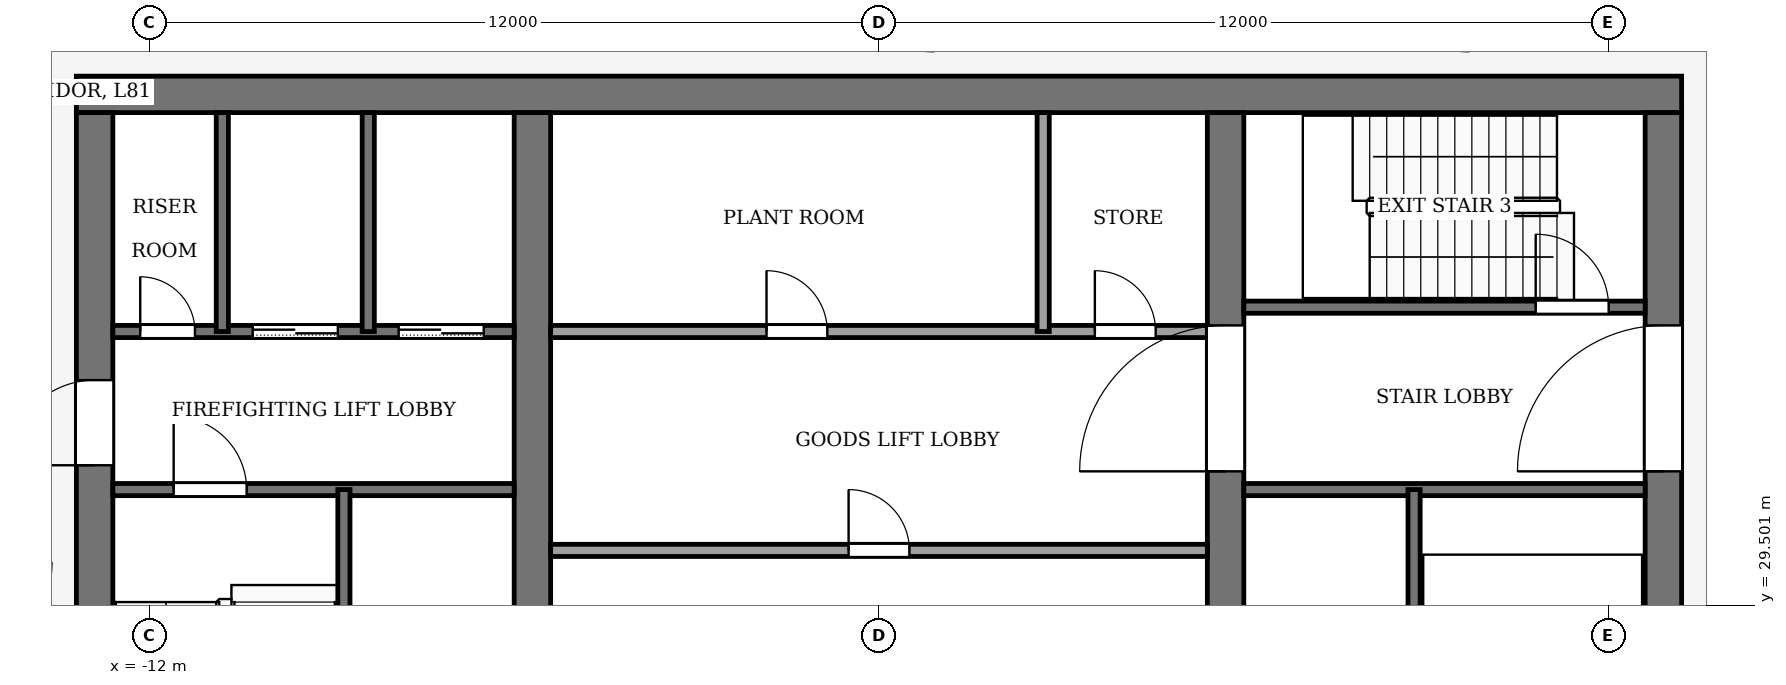
"""IFC4 building model, lengths in metres.
Left out: names, types, materials, properties, quantities, classifications, styles, units other than length and angle.
Written with IfcOpenShell. Run it as: python <this file> out.ifc"""

import sys

from ifc_helpers import new_model, si_unit, direction, frame, frame_2d, origin, place, context, subcontext, project, spatial, rectangle, extrude, element, fill, save


model = new_model("IFC4")
c1 = context("Model", 3, precision=1e-05, world=origin(), true_north=direction((0.0, 1.0)))
c2 = subcontext(c1, "Body", "Model", "MODEL_VIEW")
j1 = project(units=[si_unit("LENGTHUNIT", "METRE"), si_unit("PLANEANGLEUNIT", "RADIAN")], contexts=[c1])
p1 = place(None, origin())
s1 = spatial("IfcSite", under=j1, at=p1, CompositionType="ELEMENT")
p2 = place(p1, origin())
s2 = spatial("IfcBuilding", under=s1, at=p2, CompositionType="ELEMENT")
p3 = place(p2, frame((0.0, 0.0, 359.5)))
s3 = spatial("IfcBuildingStorey", under=s2, at=p3, CompositionType="ELEMENT", Elevation=359.5)
p4 = place(p3, frame((-13.2, 37.9, -0.15), z_axis=(0.0, 0.0, 1.0), x_axis=(1.0, 0.0, 0.0)))
e1 = element("IfcWall", 1, at=p4, inside=s3, PredefinedType="SHEAR", context=c2, shape_type="SweptSolid", body=[
    extrude(rectangle(XDim=26.4, YDim=0.6, at=frame_2d((13.2, 0.0))), origin(), (0.0, 0.0, 1.0), 4.5),
])
p5 = place(p3, frame((-12.9, 18.4, -0.15), z_axis=(0.0, 0.0, 1.0), x_axis=(0.0, 1.0, 0.0)))
e2 = element("IfcWall", 2, at=p5, inside=s3, PredefinedType="SHEAR", context=c2, shape_type="SweptSolid", body=[
    extrude(rectangle(XDim=19.2, YDim=0.6, at=frame_2d((9.6, 0.0))), origin(), (0.0, 0.0, 1.0), 4.5),
])
p6 = place(p5, frame((2.8, 0.0, 0.15)))
e3 = element("IfcOpeningElement", 3, at=p6, cuts=e2, PredefinedType="OPENING", context=c2, shape_type="SweptSolid", body=[
    extrude(rectangle(XDim=2.4, YDim=2.4, at=frame_2d((1.2, 1.2))), frame((0.0, 0.31, 0.0), z_axis=(0.0, -1.0, 0.0), x_axis=(1.0, 0.0, 0.0)), (0.0, 0.0, 1.0), 0.62),
])
p7 = place(p5, frame((13.4, 0.0, 0.15)))
e4 = element("IfcOpeningElement", 4, at=p7, cuts=e2, PredefinedType="OPENING", context=c2, shape_type="SweptSolid", body=[
    extrude(rectangle(XDim=1.4, YDim=2.2, at=frame_2d((0.7, 1.1))), frame((0.0, 0.31, 0.0), z_axis=(0.0, -1.0, 0.0), x_axis=(1.0, 0.0, 0.0)), (0.0, 0.0, 1.0), 0.62),
])
p8 = place(p3, frame((12.9, 18.4, -0.15), z_axis=(0.0, 0.0, 1.0), x_axis=(0.0, 1.0, 0.0)))
e5 = element("IfcWall", 5, at=p8, inside=s3, PredefinedType="SHEAR", context=c2, shape_type="SweptSolid", body=[
    extrude(rectangle(XDim=19.2, YDim=0.6, at=frame_2d((9.6, 0.0))), origin(), (0.0, 0.0, 1.0), 4.5),
])
p9 = place(p8, frame((2.8, 0.0, 0.15)))
e6 = element("IfcOpeningElement", 6, at=p9, cuts=e5, PredefinedType="OPENING", context=c2, shape_type="SweptSolid", body=[
    extrude(rectangle(XDim=2.4, YDim=2.4, at=frame_2d((1.2, 1.2))), frame((0.0, 0.31, 0.0), z_axis=(0.0, -1.0, 0.0), x_axis=(1.0, 0.0, 0.0)), (0.0, 0.0, 1.0), 0.62),
])
p10 = place(p8, frame((13.3, 0.0, 0.15)))
e7 = element("IfcOpeningElement", 7, at=p10, cuts=e5, PredefinedType="OPENING", context=c2, shape_type="SweptSolid", body=[
    extrude(rectangle(XDim=2.4, YDim=2.4, at=frame_2d((1.2, 1.2))), frame((0.0, 0.31, 0.0), z_axis=(0.0, -1.0, 0.0), x_axis=(1.0, 0.0, 0.0)), (0.0, 0.0, 1.0), 0.62),
])
p11 = place(p3, frame((-5.7, 18.4, -0.15), z_axis=(0.0, 0.0, 1.0), x_axis=(0.0, 1.0, 0.0)))
e8 = element("IfcWall", 8, at=p11, inside=s3, PredefinedType="SHEAR", context=c2, shape_type="SweptSolid", body=[
    extrude(rectangle(XDim=19.2, YDim=0.6, at=frame_2d((9.6, 0.0))), origin(), (0.0, 0.0, 1.0), 4.5),
])
p12 = place(p11, frame((8.35, 0.0, 0.15)))
e9 = element("IfcOpeningElement", 9, at=p12, cuts=e8, PredefinedType="OPENING", context=c2, shape_type="SweptSolid", body=[
    extrude(rectangle(XDim=0.9, YDim=2.1, at=frame_2d((0.45, 1.05))), frame((0.0, 0.31, 0.0), z_axis=(0.0, -1.0, 0.0), x_axis=(1.0, 0.0, 0.0)), (0.0, 0.0, 1.0), 0.62),
])
p13 = place(p3, frame((5.7, 18.4, -0.15), z_axis=(0.0, 0.0, 1.0), x_axis=(0.0, 1.0, 0.0)))
e10 = element("IfcWall", 10, at=p13, inside=s3, PredefinedType="SHEAR", context=c2, shape_type="SweptSolid", body=[
    extrude(rectangle(XDim=19.2, YDim=0.6, at=frame_2d((9.6, 0.0))), origin(), (0.0, 0.0, 1.0), 4.5),
])
p14 = place(p13, frame((13.3, 0.0, 0.15)))
e11 = element("IfcOpeningElement", 11, at=p14, cuts=e10, PredefinedType="OPENING", context=c2, shape_type="SweptSolid", body=[
    extrude(rectangle(XDim=2.4, YDim=2.4, at=frame_2d((1.2, 1.2))), frame((0.0, 0.31, 0.0), z_axis=(0.0, -1.0, 0.0), x_axis=(1.0, 0.0, 0.0)), (0.0, 0.0, 1.0), 0.62),
])
p15 = place(p3, frame((-5.4, 30.4, 0.0), z_axis=(0.0, 0.0, 1.0), x_axis=(1.0, 0.0, 0.0)))
e12 = element("IfcWall", 12, at=p15, inside=s3, PredefinedType="PARTITIONING", context=c2, shape_type="SweptSolid", body=[
    extrude(rectangle(XDim=10.8, YDim=0.2, at=frame_2d((5.4, 0.0))), origin(), (0.0, 0.0, 1.0), 4.35),
])
p16 = place(p15, frame((4.9, 0.0, 0.0)))
e13 = element("IfcOpeningElement", 13, at=p16, cuts=e12, PredefinedType="OPENING", context=c2, shape_type="SweptSolid", body=[
    extrude(rectangle(XDim=1.0, YDim=2.1, at=frame_2d((0.5, 1.05))), frame((0.0, 0.11, 0.0), z_axis=(0.0, -1.0, 0.0), x_axis=(1.0, 0.0, 0.0)), (0.0, 0.0, 1.0), 0.22),
])
p17 = place(p3, frame((-12.6, 31.4, 0.0), z_axis=(0.0, 0.0, 1.0), x_axis=(1.0, 0.0, 0.0)))
e14 = element("IfcWall", 14, at=p17, inside=s3, PredefinedType="PARTITIONING", context=c2, shape_type="SweptSolid", body=[
    extrude(rectangle(XDim=6.6, YDim=0.2, at=frame_2d((3.3, 0.0))), origin(), (0.0, 0.0, 1.0), 4.35),
])
p18 = place(p17, frame((1.0, 0.0, 0.0)))
e15 = element("IfcOpeningElement", 15, at=p18, cuts=e14, PredefinedType="OPENING", context=c2, shape_type="SweptSolid", body=[
    extrude(rectangle(XDim=1.2, YDim=2.2, at=frame_2d((0.6, 1.1))), frame((0.0, 0.11, 0.0), z_axis=(0.0, -1.0, 0.0), x_axis=(1.0, 0.0, 0.0)), (0.0, 0.0, 1.0), 0.22),
])
p19 = place(p3, frame((6.0, 31.4, 0.0), z_axis=(0.0, 0.0, 1.0), x_axis=(1.0, 0.0, 0.0)))
e16 = element("IfcWall", 16, at=p19, inside=s3, PredefinedType="PARTITIONING", context=c2, shape_type="SweptSolid", body=[
    extrude(rectangle(XDim=6.6, YDim=0.2, at=frame_2d((3.3, 0.0))), origin(), (0.0, 0.0, 1.0), 4.35),
])
p20 = place(p3, frame((-12.6, 34.0, 0.0), z_axis=(0.0, 0.0, 1.0), x_axis=(1.0, 0.0, 0.0)))
e17 = element("IfcWall", 17, at=p20, inside=s3, PredefinedType="PARTITIONING", context=c2, shape_type="SweptSolid", body=[
    extrude(rectangle(XDim=6.6, YDim=0.2, at=frame_2d((3.3, 0.0))), origin(), (0.0, 0.0, 1.0), 4.35),
])
p21 = place(p20, frame((4.7, 0.0, 0.0)))
e18 = element("IfcOpeningElement", 18, at=p21, cuts=e17, PredefinedType="OPENING", context=c2, shape_type="SweptSolid", body=[
    extrude(rectangle(XDim=1.4, YDim=2.2, at=frame_2d((0.7, 1.1))), frame((0.0, 0.11, 0.0), z_axis=(0.0, -1.0, 0.0), x_axis=(1.0, 0.0, 0.0)), (0.0, 0.0, 1.0), 0.22),
])
p22 = place(p20, frame((2.3, 0.0, 0.0)))
e19 = element("IfcOpeningElement", 19, at=p22, cuts=e17, PredefinedType="OPENING", context=c2, shape_type="SweptSolid", body=[
    extrude(rectangle(XDim=1.4, YDim=2.2, at=frame_2d((0.7, 1.1))), frame((0.0, 0.11, 0.0), z_axis=(0.0, -1.0, 0.0), x_axis=(1.0, 0.0, 0.0)), (0.0, 0.0, 1.0), 0.22),
])
p23 = place(p20, frame((0.45, 0.0, 0.0)))
e20 = element("IfcOpeningElement", 20, at=p23, cuts=e17, PredefinedType="OPENING", context=c2, shape_type="SweptSolid", body=[
    extrude(rectangle(XDim=0.9, YDim=2.1, at=frame_2d((0.45, 1.05))), frame((0.0, 0.11, 0.0), z_axis=(0.0, -1.0, 0.0), x_axis=(1.0, 0.0, 0.0)), (0.0, 0.0, 1.0), 0.22),
])
p24 = place(p3, frame((-5.4, 34.0, 0.0), z_axis=(0.0, 0.0, 1.0), x_axis=(1.0, 0.0, 0.0)))
e21 = element("IfcWall", 21, at=p24, inside=s3, PredefinedType="PARTITIONING", context=c2, shape_type="SweptSolid", body=[
    extrude(rectangle(XDim=10.8, YDim=0.2, at=frame_2d((5.4, 0.0))), origin(), (0.0, 0.0, 1.0), 4.35),
])
p25 = place(p24, frame((3.55, 0.0, 0.0)))
e22 = element("IfcOpeningElement", 22, at=p25, cuts=e21, PredefinedType="OPENING", context=c2, shape_type="SweptSolid", body=[
    extrude(rectangle(XDim=1.0, YDim=2.1, at=frame_2d((0.5, 1.05))), frame((0.0, 0.11, 0.0), z_axis=(0.0, -1.0, 0.0), x_axis=(1.0, 0.0, 0.0)), (0.0, 0.0, 1.0), 0.22),
])
p26 = place(p24, frame((8.95, 0.0, 0.0)))
e23 = element("IfcOpeningElement", 23, at=p26, cuts=e21, PredefinedType="OPENING", context=c2, shape_type="SweptSolid", body=[
    extrude(rectangle(XDim=1.0, YDim=2.1, at=frame_2d((0.5, 1.05))), frame((0.0, 0.11, 0.0), z_axis=(0.0, -1.0, 0.0), x_axis=(1.0, 0.0, 0.0)), (0.0, 0.0, 1.0), 0.22),
])
p27 = place(p3, frame((6.0, 34.4, 0.0), z_axis=(0.0, 0.0, 1.0), x_axis=(1.0, 0.0, 0.0)))
e24 = element("IfcWall", 24, at=p27, inside=s3, PredefinedType="PARTITIONING", context=c2, shape_type="SweptSolid", body=[
    extrude(rectangle(XDim=6.6, YDim=0.2, at=frame_2d((3.3, 0.0))), origin(), (0.0, 0.0, 1.0), 4.35),
])
p28 = place(p27, frame((4.8, 0.0, 0.0)))
e25 = element("IfcOpeningElement", 25, at=p28, cuts=e24, PredefinedType="OPENING", context=c2, shape_type="SweptSolid", body=[
    extrude(rectangle(XDim=1.2, YDim=2.2, at=frame_2d((0.6, 1.1))), frame((0.0, 0.11, 0.0), z_axis=(0.0, -1.0, 0.0), x_axis=(1.0, 0.0, 0.0)), (0.0, 0.0, 1.0), 0.22),
])
p29 = place(p3, frame((-10.8, 34.0, 0.0), z_axis=(0.0, 0.0, 1.0), x_axis=(0.0, 1.0, 0.0)))
e26 = element("IfcWall", 26, at=p29, inside=s3, PredefinedType="PARTITIONING", context=c2, shape_type="SweptSolid", body=[
    extrude(rectangle(XDim=3.6, YDim=0.2, at=frame_2d((1.8, 0.0))), origin(), (0.0, 0.0, 1.0), 4.35),
])
p30 = place(p3, frame((-8.8, 24.0, 0.0), z_axis=(0.0, 0.0, 1.0), x_axis=(0.0, 1.0, 0.0)))
e27 = element("IfcWall", 27, at=p30, inside=s3, PredefinedType="PARTITIONING", context=c2, shape_type="SweptSolid", body=[
    extrude(rectangle(XDim=7.4, YDim=0.2, at=frame_2d((3.7, 0.0))), origin(), (0.0, 0.0, 1.0), 4.35),
])
for number, where, z_axis, x_axis in (
    (28, (-8.4, 34.0, 0.0), (0.0, 0.0, 1.0), (0.0, 1.0, 0.0)),
    (29, (2.7, 34.0, 0.0), (0.0, 0.0, 1.0), (0.0, 1.0, 0.0)),
):
    element("IfcWall", number, at=place(p3, frame(where, z_axis=z_axis, x_axis=x_axis)), inside=s3, PredefinedType="PARTITIONING", context=c2, shape_type="SweptSolid", body=[
        extrude(rectangle(XDim=3.6, YDim=0.2, at=frame_2d((1.8, 0.0))), origin(), (0.0, 0.0, 1.0), 4.35),
    ])
p31 = place(p3, frame((8.8, 24.0, 0.0), z_axis=(0.0, 0.0, 1.0), x_axis=(0.0, 1.0, 0.0)))
e30 = element("IfcWall", 30, at=p31, inside=s3, PredefinedType="PARTITIONING", context=c2, shape_type="SweptSolid", body=[
    extrude(rectangle(XDim=7.4, YDim=0.2, at=frame_2d((3.7, 0.0))), origin(), (0.0, 0.0, 1.0), 4.35),
])
p32 = place(p21, origin())
e31 = element("IfcDoor", 31, at=p32, inside=s3, OperationType="SLIDING_TO_LEFT", PredefinedType="DOOR", context=c2, shape_type="SweptSolid", body=[
    extrude(rectangle(XDim=1.4, YDim=2.2, at=frame_2d((0.7, 1.1))), frame((0.0, 0.025, 0.0), z_axis=(0.0, -1.0, 0.0), x_axis=(1.0, 0.0, 0.0)), (0.0, 0.0, 1.0), 0.05),
])
fill(e18, e31)
p33 = place(p22, origin())
e32 = element("IfcDoor", 32, at=p33, inside=s3, OperationType="SLIDING_TO_LEFT", PredefinedType="DOOR", context=c2, shape_type="SweptSolid", body=[
    extrude(rectangle(XDim=1.4, YDim=2.2, at=frame_2d((0.7, 1.1))), frame((0.0, 0.025, 0.0), z_axis=(0.0, -1.0, 0.0), x_axis=(1.0, 0.0, 0.0)), (0.0, 0.0, 1.0), 0.05),
])
fill(e19, e32)
p34 = place(p23, origin())
e33 = element("IfcDoor", 33, at=p34, inside=s3, OperationType="SINGLE_SWING_LEFT", PredefinedType="DOOR", context=c2, shape_type="SweptSolid", body=[
    extrude(rectangle(XDim=0.9, YDim=2.1, at=frame_2d((0.45, 1.05))), frame((0.0, 0.025, 0.0), z_axis=(0.0, -1.0, 0.0), x_axis=(1.0, 0.0, 0.0)), (0.0, 0.0, 1.0), 0.05),
])
fill(e20, e33)
p35 = place(p16, origin())
e34 = element("IfcDoor", 34, at=p35, inside=s3, OperationType="SINGLE_SWING_LEFT", PredefinedType="DOOR", context=c2, shape_type="SweptSolid", body=[
    extrude(rectangle(XDim=1.0, YDim=2.1, at=frame_2d((0.5, 1.05))), frame((0.0, 0.025, 0.0), z_axis=(0.0, -1.0, 0.0), x_axis=(1.0, 0.0, 0.0)), (0.0, 0.0, 1.0), 0.05),
])
fill(e13, e34)
p36 = place(p25, origin())
e35 = element("IfcDoor", 35, at=p36, inside=s3, OperationType="SINGLE_SWING_LEFT", PredefinedType="DOOR", context=c2, shape_type="SweptSolid", body=[
    extrude(rectangle(XDim=1.0, YDim=2.1, at=frame_2d((0.5, 1.05))), frame((0.0, 0.025, 0.0), z_axis=(0.0, -1.0, 0.0), x_axis=(1.0, 0.0, 0.0)), (0.0, 0.0, 1.0), 0.05),
])
fill(e22, e35)
p37 = place(p26, origin())
e36 = element("IfcDoor", 36, at=p37, inside=s3, OperationType="SINGLE_SWING_LEFT", PredefinedType="DOOR", context=c2, shape_type="SweptSolid", body=[
    extrude(rectangle(XDim=1.0, YDim=2.1, at=frame_2d((0.5, 1.05))), frame((0.0, 0.025, 0.0), z_axis=(0.0, -1.0, 0.0), x_axis=(1.0, 0.0, 0.0)), (0.0, 0.0, 1.0), 0.05),
])
fill(e23, e36)
p38 = place(p18, origin())
e37 = element("IfcDoor", 37, at=p38, inside=s3, OperationType="SINGLE_SWING_LEFT", PredefinedType="DOOR", context=c2, shape_type="SweptSolid", body=[
    extrude(rectangle(XDim=1.2, YDim=2.2, at=frame_2d((0.6, 1.1))), frame((0.0, 0.025, 0.0), z_axis=(0.0, -1.0, 0.0), x_axis=(1.0, 0.0, 0.0)), (0.0, 0.0, 1.0), 0.05),
])
fill(e15, e37)
p39 = place(p28, origin())
e38 = element("IfcDoor", 38, at=p39, inside=s3, OperationType="SINGLE_SWING_LEFT", PredefinedType="DOOR", context=c2, shape_type="SweptSolid", body=[
    extrude(rectangle(XDim=1.2, YDim=2.2, at=frame_2d((0.6, 1.1))), frame((0.0, 0.025, 0.0), z_axis=(0.0, -1.0, 0.0), x_axis=(1.0, 0.0, 0.0)), (0.0, 0.0, 1.0), 0.05),
])
fill(e25, e38)
p40 = place(p14, origin())
e39 = element("IfcDoor", 39, at=p40, inside=s3, OperationType="DOUBLE_DOOR_SINGLE_SWING", PredefinedType="DOOR", context=c2, shape_type="SweptSolid", body=[
    extrude(rectangle(XDim=2.4, YDim=2.4, at=frame_2d((1.2, 1.2))), frame((0.0, 0.025, 0.0), z_axis=(0.0, -1.0, 0.0), x_axis=(1.0, 0.0, 0.0)), (0.0, 0.0, 1.0), 0.05),
])
fill(e11, e39)
p41 = place(p10, origin())
e40 = element("IfcDoor", 40, at=p41, inside=s3, OperationType="DOUBLE_DOOR_SINGLE_SWING", PredefinedType="DOOR", context=c2, shape_type="SweptSolid", body=[
    extrude(rectangle(XDim=2.4, YDim=2.4, at=frame_2d((1.2, 1.2))), frame((0.0, 0.025, 0.0), z_axis=(0.0, -1.0, 0.0), x_axis=(1.0, 0.0, 0.0)), (0.0, 0.0, 1.0), 0.05),
])
fill(e7, e40)
p42 = place(p7, origin())
e41 = element("IfcDoor", 41, at=p42, inside=s3, OperationType="SINGLE_SWING_LEFT", PredefinedType="DOOR", context=c2, shape_type="SweptSolid", body=[
    extrude(rectangle(XDim=1.4, YDim=2.2, at=frame_2d((0.7, 1.1))), frame((0.0, 0.025, 0.0), z_axis=(0.0, -1.0, 0.0), x_axis=(1.0, 0.0, 0.0)), (0.0, 0.0, 1.0), 0.05),
])
fill(e4, e41)
save(model, sys.argv[1])
